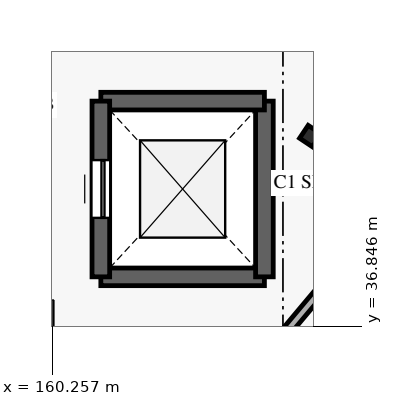
"""IFC4 building model, lengths in metres.
Left out: names, types, materials, properties, quantities, classifications, styles, units other than length and angle.
Written with IfcOpenShell. Run it as: python <this file> out.ifc"""

import sys

from ifc_helpers import new_model, si_unit, direction, frame, frame_2d, origin, origin_2d, place, context, subcontext, project, spatial, rectangle, i_section, extrude, element, fill, save


model = new_model("IFC4")
c1 = context("Model", 3, precision=1e-05, world=origin(), true_north=direction((0.0, 1.0)))
c2 = subcontext(c1, "Body", "Model", "MODEL_VIEW")
j1 = project(units=[si_unit("LENGTHUNIT", "METRE"), si_unit("PLANEANGLEUNIT", "RADIAN")], contexts=[c1])
p1 = place(None, origin())
s1 = spatial("IfcSite", under=j1, at=p1, CompositionType="ELEMENT")
p2 = place(p1, origin())
s2 = spatial("IfcBuilding", under=s1, at=p2, CompositionType="ELEMENT")
p3 = place(p2, frame((0.0, 0.0, 12.6)))
s3 = spatial("IfcBuildingStorey", under=s2, at=p3, CompositionType="ELEMENT", Elevation=12.6)
p4 = place(p3, frame((164.5, 39.97, 0.0), z_axis=(0.0, 0.0, 1.0), x_axis=(-0.831469612303, 0.55557023302, 0.0)))
e1 = element("IfcColumn", 1, at=p4, inside=s3, PredefinedType="COLUMN", context=c2, shape_type="SweptSolid", body=[
    extrude(i_section(OverallWidth=0.255, OverallDepth=0.254, WebThickness=0.009, FlangeThickness=0.014, FilletRadius=0.013, at=origin_2d()), origin(), (0.0, 0.0, 1.0), 4.2),
])
p5 = place(p3, frame((161.055, 37.655, 0.0), z_axis=(0.0, 0.0, 1.0), x_axis=(1.0, 0.0, 0.0)))
e2 = element("IfcWall", 2, at=p5, inside=s3, PredefinedType="SHEAR", context=c2, shape_type="SweptSolid", body=[
    extrude(rectangle(XDim=2.69, YDim=0.29, at=frame_2d((1.345, 0.0))), origin(), (0.0, 0.0, 1.0), 3.95),
])
p6 = place(p3, frame((163.745, 37.655, 0.0), z_axis=(0.0, 0.0, 1.0), x_axis=(0.0, 1.0, 0.0)))
e3 = element("IfcWall", 3, at=p6, inside=s3, PredefinedType="SHEAR", context=c2, shape_type="SweptSolid", body=[
    extrude(rectangle(XDim=2.89, YDim=0.29, at=frame_2d((1.445, 0.0))), origin(), (0.0, 0.0, 1.0), 3.95),
])
p7 = place(p3, frame((163.745, 40.545, 0.0), z_axis=(0.0, 0.0, 1.0), x_axis=(-1.0, 0.0, 0.0)))
e4 = element("IfcWall", 4, at=p7, inside=s3, PredefinedType="SHEAR", context=c2, shape_type="SweptSolid", body=[
    extrude(rectangle(XDim=2.69, YDim=0.29, at=frame_2d((1.345, 0.0))), origin(), (0.0, 0.0, 1.0), 3.95),
])
p8 = place(p3, frame((161.055, 40.545, 0.0), z_axis=(0.0, 0.0, 1.0), x_axis=(0.0, -1.0, 0.0)))
e5 = element("IfcWall", 5, at=p8, inside=s3, PredefinedType="SHEAR", context=c2, shape_type="SweptSolid", body=[
    extrude(rectangle(XDim=2.89, YDim=0.29, at=frame_2d((1.445, 0.0))), origin(), (0.0, 0.0, 1.0), 3.95),
])
p9 = place(p8, frame((0.97, 0.0, 0.0)))
e6 = element("IfcOpeningElement", 6, at=p9, cuts=e5, PredefinedType="OPENING", context=c2, shape_type="SweptSolid", body=[
    extrude(rectangle(XDim=0.95, YDim=2.1, at=frame_2d((0.475, 1.05))), frame((0.0, 0.155, 0.0), z_axis=(0.0, -1.0, 0.0), x_axis=(1.0, 0.0, 0.0)), (0.0, 0.0, 1.0), 0.31),
])
p10 = place(p3, frame((169.058, 42.658, 0.0), z_axis=(0.0, 0.0, 1.0), x_axis=(-0.642785558664, -0.766046164127, 0.0)))
e7 = element("IfcWall", 7, at=p10, inside=s3, PredefinedType="PARTITIONING", context=c2, shape_type="SweptSolid", body=[
    extrude(rectangle(XDim=12.538, YDim=0.15, at=frame_2d((6.269, 0.0))), origin(), (0.0, 0.0, 1.0), 3.95),
])
p11 = place(p10, frame((2.875, 0.0, 0.0)))
e8 = element("IfcOpeningElement", 8, at=p11, cuts=e7, PredefinedType="OPENING", context=c2, shape_type="SweptSolid", body=[
    extrude(rectangle(XDim=1.04, YDim=2.1, at=frame_2d((0.52, 1.05))), frame((0.0, 0.085, 0.0), z_axis=(0.0, -1.0, 0.0), x_axis=(1.0, 0.0, 0.0)), (0.0, 0.0, 1.0), 0.17),
])
p12 = place(p9, frame((0.95, 0.0, 0.0), z_axis=(0.0, 0.0, 1.0), x_axis=(-1.0, 0.0, 0.0)))
e9 = element("IfcDoor", 9, at=p12, inside=s3, OperationType="SLIDING_TO_LEFT", PredefinedType="DOOR", context=c2, shape_type="SweptSolid", body=[
    extrude(rectangle(XDim=0.95, YDim=2.1, at=frame_2d((0.475, 1.05))), frame((0.0, 0.025, 0.0), z_axis=(0.0, -1.0, 0.0), x_axis=(1.0, 0.0, 0.0)), (0.0, 0.0, 1.0), 0.05),
])
fill(e6, e9)
save(model, sys.argv[1])
